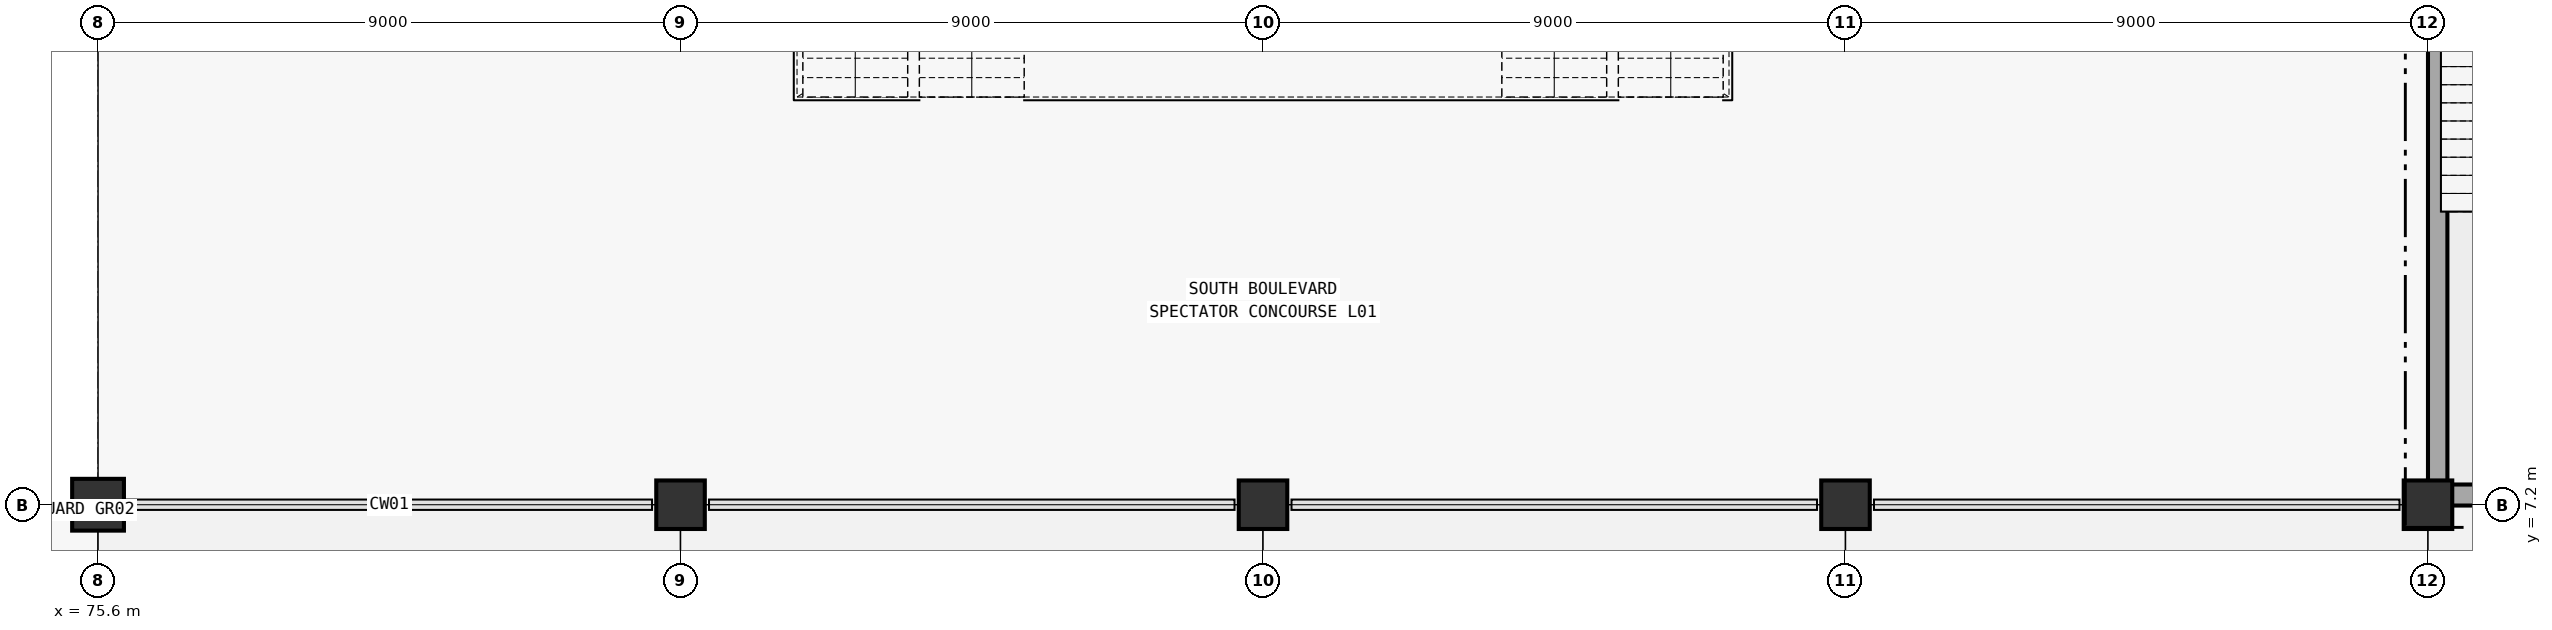
"""IFC4 building model, lengths in metres.
Left out: names, types, materials, properties, quantities, classifications, styles, units other than length and angle.
Written with IfcOpenShell. Run it as: python <this file> out.ifc"""

import sys

from ifc_helpers import new_model, si_unit, direction, frame, frame_2d, origin, origin_2d, place, context, subcontext, project, spatial, rectangle, circle, extrude, element, save


model = new_model("IFC4")
c1 = context("Model", 3, precision=1e-05, world=origin(), true_north=direction((0.0, 1.0)))
c2 = subcontext(c1, "Body", "Model", "MODEL_VIEW")
j1 = project(units=[si_unit("LENGTHUNIT", "METRE"), si_unit("PLANEANGLEUNIT", "RADIAN")], contexts=[c1])
p1 = place(None, origin())
s1 = spatial("IfcSite", under=j1, at=p1, CompositionType="ELEMENT")
p2 = place(p1, origin())
s2 = spatial("IfcBuilding", under=s1, at=p2, CompositionType="ELEMENT")
p3 = place(p2, frame((0.0, 0.0, 5.4)))
s3 = spatial("IfcBuildingStorey", under=s2, at=p3, CompositionType="ELEMENT", Elevation=5.4)
p4 = place(p3, frame((75.6, 7.2, 0.0), z_axis=(0.0, 0.0, 1.0), x_axis=(1.0, 0.0, 0.0)))
e1 = element("IfcColumn", 1, at=p4, inside=s3, PredefinedType="COLUMN", context=c2, shape_type="SweptSolid", body=[
    extrude(rectangle(XDim=0.8, YDim=0.8, at=origin_2d()), origin(), (0.0, 0.0, 1.0), 5.4),
])
for number, where, z_axis, x_axis in (
    (2, (84.6, 7.2, 0.0), (0.0, 0.0, 1.0), (1.0, 0.0, 0.0)),
    (3, (93.6, 7.2, 0.0), (0.0, 0.0, 1.0), (1.0, 0.0, 0.0)),
    (4, (102.6, 7.2, 0.0), (0.0, 0.0, 1.0), (1.0, 0.0, 0.0)),
    (5, (111.6, 7.2, 0.0), (0.0, 0.0, 1.0), (1.0, 0.0, 0.0)),
):
    element("IfcColumn", number, at=place(p3, frame(where, z_axis=z_axis, x_axis=x_axis)), inside=s3, PredefinedType="COLUMN", context=c2, shape_type="SweptSolid", body=[
        extrude(circle(Radius=0.375, at=origin_2d()), origin(), (0.0, 0.0, 1.0), 5.4),
    ])
p5 = place(p3, frame((118.8, 7.35, 0.0), z_axis=(0.0, 0.0, 1.0), x_axis=(-1.0, 0.0, 0.0)))
e6 = element("IfcWall", 6, at=p5, inside=s3, PredefinedType="SHEAR", context=c2, shape_type="SweptSolid", body=[
    extrude(rectangle(XDim=7.2, YDim=0.325, at=frame_2d((3.6, 0.0))), origin(), (0.0, 0.0, 1.0), 5.4),
])
p6 = place(p3, frame((111.75, 7.5, 0.0), z_axis=(0.0, 0.0, 1.0), x_axis=(0.0, 1.0, 0.0)))
e7 = element("IfcWall", 7, at=p6, inside=s3, PredefinedType="SHEAR", context=c2, shape_type="SweptSolid", body=[
    extrude(rectangle(XDim=10.2, YDim=0.3, at=frame_2d((5.1, 0.0))), origin(), (0.0, 0.0, 1.0), 5.4),
])
p7 = place(p2, frame((0.0, 0.0, 10.8)))
s4 = spatial("IfcBuildingStorey", under=s2, at=p7, CompositionType="ELEMENT", Elevation=10.8)
p8 = place(p7, frame((75.6, 6.804, -5.45), z_axis=(0.0, 0.0, 1.0), x_axis=(0.0, -1.0, 0.0)))
e8 = element("IfcWall", 8, at=p8, inside=s4, PredefinedType="STANDARD", context=c2, shape_type="SweptSolid", body=[
    extrude(rectangle(XDim=6.408, YDim=0.365, at=frame_2d((3.204, 0.0))), origin(), (0.0, 0.0, 1.0), 4.565),
])
save(model, sys.argv[1])
